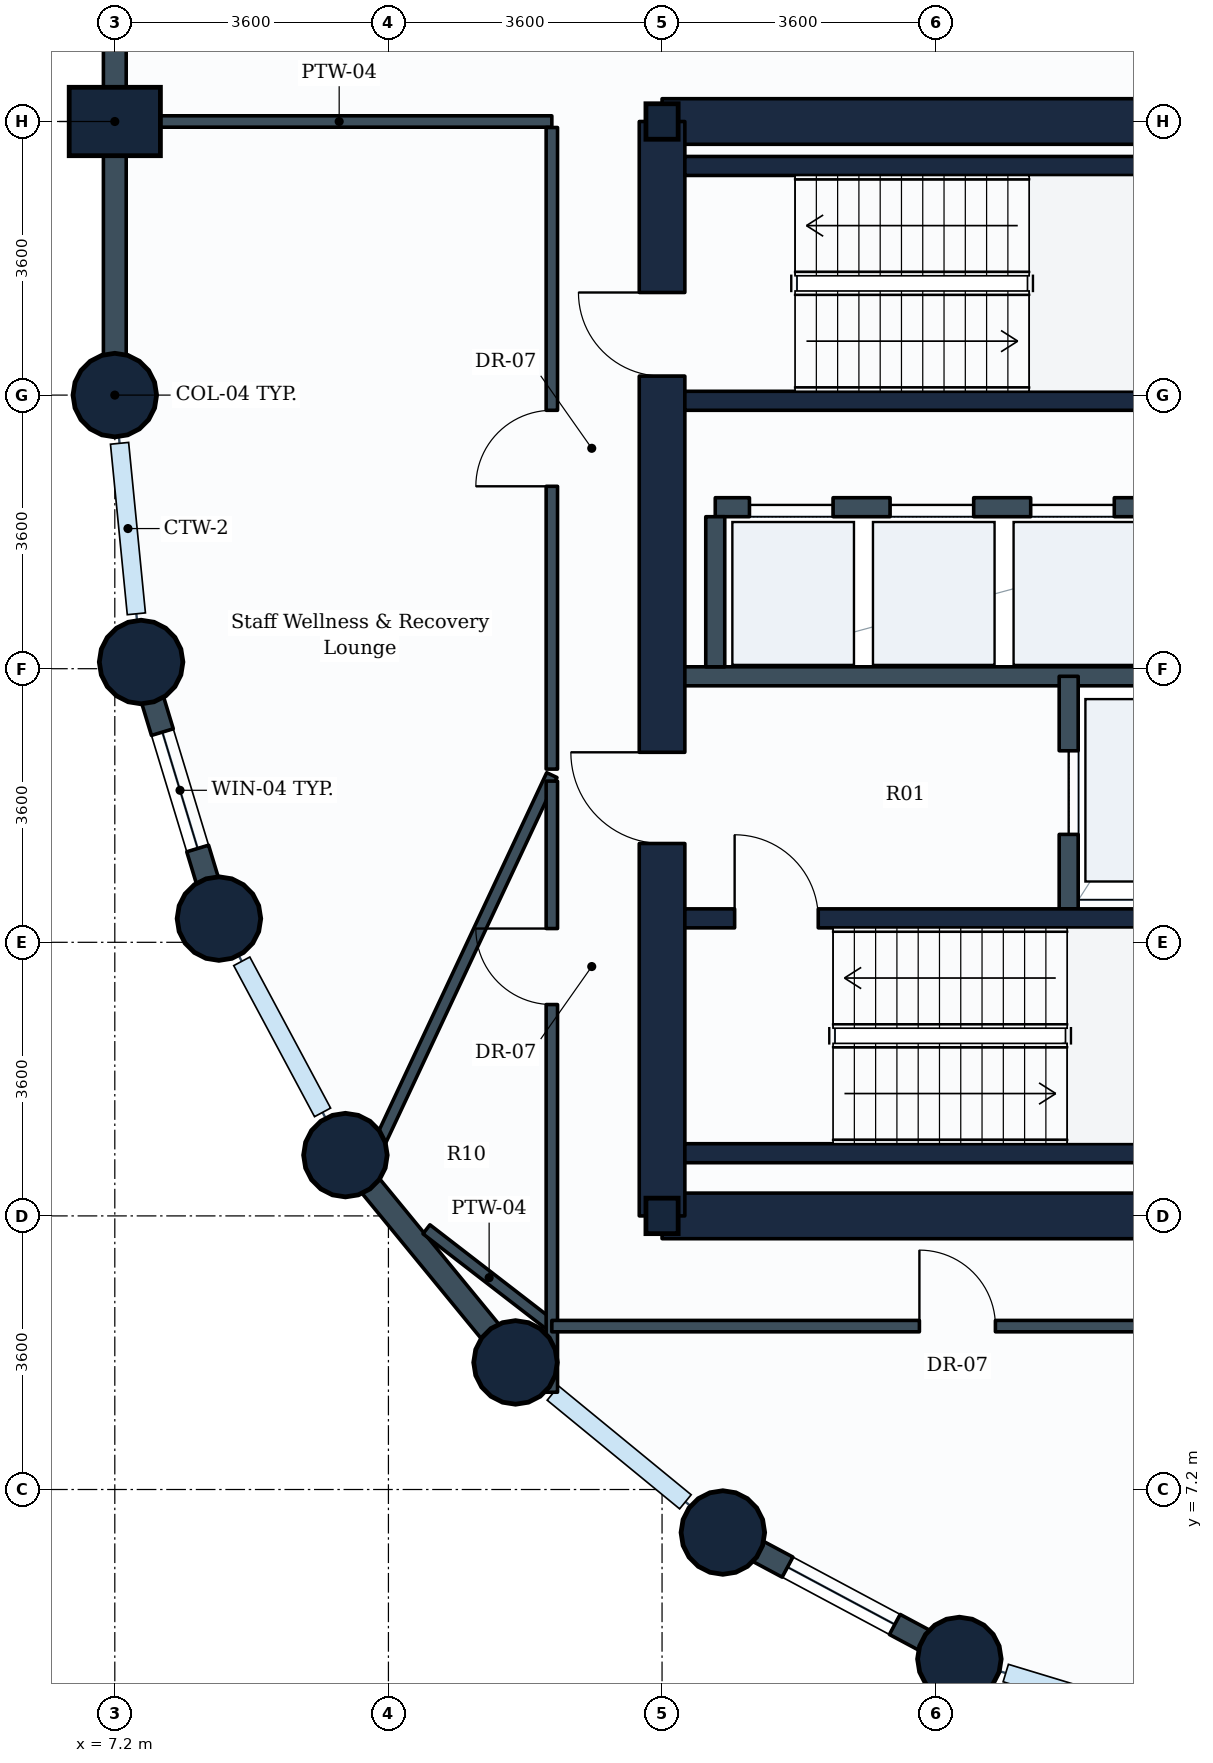
"""IFC4 building model, lengths in metres.
Left out: names, types, materials, properties, quantities, classifications, styles, units other than length and angle.
Written with IfcOpenShell. Run it as: python <this file> out.ifc"""

import sys

from ifc_helpers import new_model, si_unit, direction, frame, frame_2d, origin, origin_2d, place, context, subcontext, project, spatial, rectangle, circle, i_section, extrude, element, fill, save


model = new_model("IFC4")
c1 = context("Model", 3, precision=1e-05, world=origin(), true_north=direction((0.0, 1.0)))
c2 = subcontext(c1, "Body", "Model", "MODEL_VIEW")
j1 = project(units=[si_unit("LENGTHUNIT", "METRE"), si_unit("PLANEANGLEUNIT", "RADIAN")], contexts=[c1])
p1 = place(None, origin())
s1 = spatial("IfcSite", under=j1, at=p1, CompositionType="ELEMENT")
p2 = place(p1, origin())
s2 = spatial("IfcBuilding", under=s1, at=p2, CompositionType="ELEMENT")
p3 = place(p2, frame((0.0, 0.0, 51.3)))
s3 = spatial("IfcBuildingStorey", under=s2, at=p3, CompositionType="ELEMENT", Elevation=51.3)
p4 = place(p3, frame((7.2, 21.6, 0.0), z_axis=(0.0, 0.0, 1.0), x_axis=(1.0, 0.0, 0.0)))
e1 = element("IfcColumn", 1, at=p4, inside=s3, PredefinedType="COLUMN", context=c2, shape_type="SweptSolid", body=[
    extrude(circle(Radius=0.55, at=origin_2d()), origin(), (0.0, 0.0, 1.0), 3.9),
])
p5 = place(p3, frame((7.2, 25.2, 0.0), z_axis=(0.0, 0.0, 1.0), x_axis=(0.0, 1.0, 0.0)))
e2 = element("IfcColumn", 2, at=p5, inside=s3, PredefinedType="COLUMN", context=c2, shape_type="SweptSolid", body=[
    extrude(rectangle(XDim=0.9, YDim=1.2, at=origin_2d()), origin(), (0.0, 0.0, 1.0), 3.9),
])
for number, where, z_axis, x_axis in (
    (3, (7.546, 18.088, 0.0), (0.0, 0.0, 1.0), (1.0, 0.0, 0.0)),
    (4, (8.57, 14.712, 0.0), (0.0, 0.0, 1.0), (1.0, 0.0, 0.0)),
    (5, (10.234, 11.6, 0.0), (0.0, 0.0, 1.0), (1.0, 0.0, 0.0)),
    (6, (12.472, 8.872, 0.0), (0.0, 0.0, 1.0), (1.0, 0.0, 0.0)),
):
    element("IfcColumn", number, at=place(p3, frame(where, z_axis=z_axis, x_axis=x_axis)), inside=s3, PredefinedType="COLUMN", context=c2, shape_type="SweptSolid", body=[
        extrude(circle(Radius=0.55, at=origin_2d()), origin(), (0.0, 0.0, 1.0), 3.9),
    ])
for number, where, z_axis, x_axis in (
    (7, (14.4, 10.8, 0.0), (0.0, 0.0, 1.0), (1.0, 0.0, 0.0)),
    (8, (14.4, 25.2, 0.0), (0.0, 0.0, 1.0), (1.0, 0.0, 0.0)),
):
    element("IfcColumn", number, at=place(p3, frame(where, z_axis=z_axis, x_axis=x_axis)), inside=s3, PredefinedType="COLUMN", context=c2, shape_type="SweptSolid", body=[
        extrude(i_section(OverallWidth=0.424, OverallDepth=0.467, WebThickness=0.033, FlangeThickness=0.053, FilletRadius=0.015, at=origin_2d()), origin(), (0.0, 0.0, 1.0), 3.9),
    ])
for number, where, z_axis, x_axis in (
    (9, (15.2, 6.634, 0.0), (0.0, 0.0, 1.0), (1.0, 0.0, 0.0)),
    (10, (18.312, 4.97, 0.0), (0.0, 0.0, 1.0), (1.0, 0.0, 0.0)),
):
    element("IfcColumn", number, at=place(p3, frame(where, z_axis=z_axis, x_axis=x_axis)), inside=s3, PredefinedType="COLUMN", context=c2, shape_type="SweptSolid", body=[
        extrude(circle(Radius=0.55, at=origin_2d()), origin(), (0.0, 0.0, 1.0), 3.9),
    ])
p6 = place(p3, frame((7.2, 25.2, 0.0), z_axis=(0.0, 0.0, 1.0), x_axis=(0.0, 1.0, 0.0)))
e11 = element("IfcWall", 11, at=p6, inside=s3, PredefinedType="STANDARD", context=c2, shape_type="SweptSolid", body=[
    extrude(rectangle(XDim=3.6, YDim=0.3, at=frame_2d((1.8, 0.0))), origin(), (0.0, 0.0, 1.0), 2.93),
])
p7 = place(p3, frame((7.2, 21.6, 0.0), z_axis=(0.0, 0.0, 1.0), x_axis=(0.0, 1.0, 0.0)))
e12 = element("IfcWall", 12, at=p7, inside=s3, PredefinedType="STANDARD", context=c2, shape_type="SweptSolid", body=[
    extrude(rectangle(XDim=3.6, YDim=0.3, at=frame_2d((1.8, 0.0))), origin(), (0.0, 0.0, 1.0), 2.93),
])
p8 = place(p3, frame((8.57, 14.712, 0.0), z_axis=(0.0, 0.0, 1.0), x_axis=(-0.290305086481, 0.956934144423, 0.0)))
e13 = element("IfcWall", 13, at=p8, inside=s3, PredefinedType="STANDARD", context=c2, shape_type="SweptSolid", body=[
    extrude(rectangle(XDim=3.528, YDim=0.3, at=frame_2d((1.764, 0.0))), origin(), (0.0, 0.0, 1.0), 2.93),
])
p9 = place(p8, frame((0.964, 0.0, 0.85)))
e14 = element("IfcOpeningElement", 14, at=p9, cuts=e13, PredefinedType="OPENING", context=c2, shape_type="SweptSolid", body=[
    extrude(rectangle(XDim=1.6, YDim=1.35, at=frame_2d((0.8, 0.675))), frame((0.0, 0.16, 0.0), z_axis=(0.0, -1.0, 0.0), x_axis=(1.0, 0.0, 0.0)), (0.0, 0.0, 1.0), 0.32),
])
p10 = place(p3, frame((12.472, 8.872, 0.0), z_axis=(0.0, 0.0, 1.0), x_axis=(-0.634258295121, 0.773121216285, 0.0)))
e15 = element("IfcWall", 15, at=p10, inside=s3, PredefinedType="STANDARD", context=c2, shape_type="SweptSolid", body=[
    extrude(rectangle(XDim=3.529, YDim=0.3, at=frame_2d((1.764, 0.0))), origin(), (0.0, 0.0, 1.0), 2.93),
])
p11 = place(p3, frame((18.312, 4.97, 0.0), z_axis=(0.0, 0.0, 1.0), x_axis=(-0.881846862014, 0.471535907389, 0.0)))
e16 = element("IfcWall", 16, at=p11, inside=s3, PredefinedType="STANDARD", context=c2, shape_type="SweptSolid", body=[
    extrude(rectangle(XDim=3.529, YDim=0.3, at=frame_2d((1.765, 0.0))), origin(), (0.0, 0.0, 1.0), 2.93),
])
p12 = place(p11, frame((0.964, 0.0, 0.85)))
e17 = element("IfcOpeningElement", 17, at=p12, cuts=e16, PredefinedType="OPENING", context=c2, shape_type="SweptSolid", body=[
    extrude(rectangle(XDim=1.6, YDim=1.35, at=frame_2d((0.8, 0.675))), frame((0.0, 0.16, 0.0), z_axis=(0.0, -1.0, 0.0), x_axis=(1.0, 0.0, 0.0)), (0.0, 0.0, 1.0), 0.32),
])
p13 = place(p3, frame((14.4, 10.8, 0.0), z_axis=(0.0, 0.0, 1.0), x_axis=(1.0, 0.0, 0.0)))
e18 = element("IfcWall", 18, at=p13, inside=s3, PredefinedType="SHEAR", context=c2, shape_type="SweptSolid", body=[
    extrude(rectangle(XDim=18.0, YDim=0.6, at=frame_2d((9.0, 0.0))), origin(), (0.0, 0.0, 1.0), 3.65),
])
p14 = place(p3, frame((14.4, 25.2, 0.0), z_axis=(0.0, 0.0, 1.0), x_axis=(1.0, 0.0, 0.0)))
e19 = element("IfcWall", 19, at=p14, inside=s3, PredefinedType="SHEAR", context=c2, shape_type="SweptSolid", body=[
    extrude(rectangle(XDim=14.4, YDim=0.6, at=frame_2d((7.2, 0.0))), origin(), (0.0, 0.0, 1.0), 3.65),
])
p15 = place(p3, frame((14.4, 10.8, 0.0), z_axis=(0.0, 0.0, 1.0), x_axis=(0.0, 1.0, 0.0)))
e20 = element("IfcWall", 20, at=p15, inside=s3, PredefinedType="SHEAR", context=c2, shape_type="SweptSolid", body=[
    extrude(rectangle(XDim=14.4, YDim=0.6, at=frame_2d((7.2, 0.0))), origin(), (0.0, 0.0, 1.0), 3.65),
])
p16 = place(p15, frame((11.05, 0.0, 0.0)))
e21 = element("IfcOpeningElement", 21, at=p16, cuts=e20, PredefinedType="OPENING", context=c2, shape_type="SweptSolid", body=[
    extrude(rectangle(XDim=1.1, YDim=2.1, at=frame_2d((0.55, 1.05))), frame((0.0, 0.31, 0.0), z_axis=(0.0, -1.0, 0.0), x_axis=(1.0, 0.0, 0.0)), (0.0, 0.0, 1.0), 0.62),
])
p17 = place(p15, frame((4.9, 0.0, 0.0)))
e22 = element("IfcOpeningElement", 22, at=p17, cuts=e20, PredefinedType="OPENING", context=c2, shape_type="SweptSolid", body=[
    extrude(rectangle(XDim=1.2, YDim=2.1, at=frame_2d((0.6, 1.05))), frame((0.0, 0.31, 0.0), z_axis=(0.0, -1.0, 0.0), x_axis=(1.0, 0.0, 0.0)), (0.0, 0.0, 1.0), 0.62),
])
p18 = place(p3, frame((14.7, 11.625, 0.0), z_axis=(0.0, 0.0, 1.0), x_axis=(1.0, 0.0, 0.0)))
e23 = element("IfcWall", 23, at=p18, inside=s3, PredefinedType="SHEAR", context=c2, shape_type="SweptSolid", body=[
    extrude(rectangle(XDim=8.65, YDim=0.25, at=frame_2d((4.325, 0.0))), origin(), (0.0, 0.0, 1.0), 3.65),
])
p19 = place(p3, frame((14.7, 14.715, 0.0), z_axis=(0.0, 0.0, 1.0), x_axis=(1.0, 0.0, 0.0)))
e24 = element("IfcWall", 24, at=p19, inside=s3, PredefinedType="SHEAR", context=c2, shape_type="SweptSolid", body=[
    extrude(rectangle(XDim=8.65, YDim=0.25, at=frame_2d((4.325, 0.0))), origin(), (0.0, 0.0, 1.0), 3.65),
])
p20 = place(p19, frame((0.655, 0.0, 0.0)))
e25 = element("IfcOpeningElement", 25, at=p20, cuts=e24, PredefinedType="OPENING", context=c2, shape_type="SweptSolid", body=[
    extrude(rectangle(XDim=1.1, YDim=2.1, at=frame_2d((0.55, 1.05))), frame((0.0, 0.135, 0.0), z_axis=(0.0, -1.0, 0.0), x_axis=(1.0, 0.0, 0.0)), (0.0, 0.0, 1.0), 0.27),
])
for number, where, z_axis, x_axis in (
    (26, (14.7, 21.525, 0.0), (0.0, 0.0, 1.0), (1.0, 0.0, 0.0)),
    (27, (14.7, 24.615, 0.0), (0.0, 0.0, 1.0), (1.0, 0.0, 0.0)),
):
    element("IfcWall", number, at=place(p3, frame(where, z_axis=z_axis, x_axis=x_axis)), inside=s3, PredefinedType="SHEAR", context=c2, shape_type="SweptSolid", body=[
        extrude(rectangle(XDim=8.2, YDim=0.25, at=frame_2d((4.1, 0.0))), origin(), (0.0, 0.0, 1.0), 3.65),
    ])
p21 = place(p3, frame((14.65, 17.9, 0.0), z_axis=(0.0, 0.0, 1.0), x_axis=(1.0, 0.0, 0.0)))
e28 = element("IfcWall", 28, at=p21, inside=s3, PredefinedType="PARTITIONING", context=c2, shape_type="SweptSolid", body=[
    extrude(rectangle(XDim=7.15, YDim=0.25, at=frame_2d((3.575, 0.0))), origin(), (0.0, 0.0, 1.0), 3.635),
])
p22 = place(p3, frame((19.75, 14.84, 0.0), z_axis=(0.0, 0.0, 1.0), x_axis=(0.0, 1.0, 0.0)))
e29 = element("IfcWall", 29, at=p22, inside=s3, PredefinedType="PARTITIONING", context=c2, shape_type="SweptSolid", body=[
    extrude(rectangle(XDim=3.06, YDim=0.25, at=frame_2d((1.53, 0.0))), origin(), (0.0, 0.0, 1.0), 3.635),
])
p23 = place(p22, frame((0.98, 0.0, 0.0)))
e30 = element("IfcOpeningElement", 30, at=p23, cuts=e29, PredefinedType="OPENING", context=c2, shape_type="SweptSolid", body=[
    extrude(rectangle(XDim=1.1, YDim=2.1, at=frame_2d((0.55, 1.05))), frame((0.0, 0.135, 0.0), z_axis=(0.0, -1.0, 0.0), x_axis=(1.0, 0.0, 0.0)), (0.0, 0.0, 1.0), 0.27),
])
p24 = place(p3, frame((15.1, 20.125, 0.0), z_axis=(0.0, 0.0, 1.0), x_axis=(1.0, 0.0, 0.0)))
e31 = element("IfcWall", 31, at=p24, inside=s3, PredefinedType="PARTITIONING", context=c2, shape_type="SweptSolid", body=[
    extrude(rectangle(XDim=7.55, YDim=0.25, at=frame_2d((3.775, 0.0))), origin(), (0.0, 0.0, 1.0), 3.635),
])
p25 = place(p24, frame((0.45, 0.0, 0.0)))
e32 = element("IfcOpeningElement", 32, at=p25, cuts=e31, PredefinedType="OPENING", context=c2, shape_type="SweptSolid", body=[
    extrude(rectangle(XDim=1.1, YDim=2.1, at=frame_2d((0.55, 1.05))), frame((0.0, 0.135, 0.0), z_axis=(0.0, -1.0, 0.0), x_axis=(1.0, 0.0, 0.0)), (0.0, 0.0, 1.0), 0.27),
])
p26 = place(p24, frame((2.3, 0.0, 0.0)))
e33 = element("IfcOpeningElement", 33, at=p26, cuts=e31, PredefinedType="OPENING", context=c2, shape_type="SweptSolid", body=[
    extrude(rectangle(XDim=1.1, YDim=2.1, at=frame_2d((0.55, 1.05))), frame((0.0, 0.135, 0.0), z_axis=(0.0, -1.0, 0.0), x_axis=(1.0, 0.0, 0.0)), (0.0, 0.0, 1.0), 0.27),
])
p27 = place(p24, frame((4.15, 0.0, 0.0)))
e34 = element("IfcOpeningElement", 34, at=p27, cuts=e31, PredefinedType="OPENING", context=c2, shape_type="SweptSolid", body=[
    extrude(rectangle(XDim=1.1, YDim=2.1, at=frame_2d((0.55, 1.05))), frame((0.0, 0.135, 0.0), z_axis=(0.0, -1.0, 0.0), x_axis=(1.0, 0.0, 0.0)), (0.0, 0.0, 1.0), 0.27),
])
p28 = place(p24, frame((6.0, 0.0, 0.0)))
e35 = element("IfcOpeningElement", 35, at=p28, cuts=e31, PredefinedType="OPENING", context=c2, shape_type="SweptSolid", body=[
    extrude(rectangle(XDim=1.1, YDim=2.1, at=frame_2d((0.55, 1.05))), frame((0.0, 0.135, 0.0), z_axis=(0.0, -1.0, 0.0), x_axis=(1.0, 0.0, 0.0)), (0.0, 0.0, 1.0), 0.27),
])
p29 = place(p3, frame((15.1, 18.025, 0.0), z_axis=(0.0, 0.0, 1.0), x_axis=(0.0, 1.0, 0.0)))
e36 = element("IfcWall", 36, at=p29, inside=s3, PredefinedType="PARTITIONING", context=c2, shape_type="SweptSolid", body=[
    extrude(rectangle(XDim=1.975, YDim=0.25, at=frame_2d((0.988, 0.0))), origin(), (0.0, 0.0, 1.0), 3.635),
])
p30 = place(p3, frame((7.354, 25.2, 0.0), z_axis=(0.0, 0.0, 1.0), x_axis=(1.0, 0.0, 0.0)))
e37 = element("IfcWall", 37, at=p30, inside=s3, PredefinedType="PARTITIONING", context=c2, shape_type="SweptSolid", body=[
    extrude(rectangle(XDim=5.596, YDim=0.15, at=frame_2d((2.798, 0.0))), origin(), (0.0, 0.0, 1.0), 3.635),
])
p31 = place(p3, frame((12.95, 9.35, 0.0), z_axis=(0.0, 0.0, 1.0), x_axis=(-0.791573423038, 0.611074067474, 0.0)))
e38 = element("IfcWall", 38, at=p31, inside=s3, PredefinedType="PARTITIONING", context=c2, shape_type="SweptSolid", body=[
    extrude(rectangle(XDim=2.084, YDim=0.15, at=frame_2d((1.042, 0.0))), origin(), (0.0, 0.0, 1.0), 2.93),
])
p32 = place(p3, frame((12.95, 16.6, 0.0), z_axis=(0.0, 0.0, 1.0), x_axis=(-0.424335060038, -0.905505249473, 0.0)))
e39 = element("IfcWall", 39, at=p32, inside=s3, PredefinedType="PARTITIONING", context=c2, shape_type="SweptSolid", body=[
    extrude(rectangle(XDim=5.76, YDim=0.15, at=frame_2d((2.88, 0.0))), origin(), (0.0, 0.0, 1.0), 2.93),
])
p33 = place(p3, frame((12.95, 16.679, 0.0), z_axis=(0.0, 0.0, 1.0), x_axis=(0.0, 1.0, 0.0)))
e40 = element("IfcWall", 40, at=p33, inside=s3, PredefinedType="PARTITIONING", context=c2, shape_type="SweptSolid", body=[
    extrude(rectangle(XDim=8.442, YDim=0.15, at=frame_2d((4.221, 0.0))), origin(), (0.0, 0.0, 1.0), 3.08),
])
p34 = place(p33, frame((3.721, 0.0, 0.0)))
e41 = element("IfcOpeningElement", 41, at=p34, cuts=e40, PredefinedType="OPENING", context=c2, shape_type="SweptSolid", body=[
    extrude(rectangle(XDim=1.0, YDim=2.1, at=frame_2d((0.5, 1.05))), frame((0.0, 0.085, 0.0), z_axis=(0.0, -1.0, 0.0), x_axis=(1.0, 0.0, 0.0)), (0.0, 0.0, 1.0), 0.17),
])
p35 = place(p3, frame((12.95, 8.48, 0.0), z_axis=(0.0, 0.0, 1.0), x_axis=(0.0, 1.0, 0.0)))
e42 = element("IfcWall", 42, at=p35, inside=s3, PredefinedType="PARTITIONING", context=c2, shape_type="SweptSolid", body=[
    extrude(rectangle(XDim=8.041, YDim=0.15, at=frame_2d((4.021, 0.0))), origin(), (0.0, 0.0, 1.0), 2.93),
])
p36 = place(p35, frame((5.101, 0.0, 0.0)))
e43 = element("IfcOpeningElement", 43, at=p36, cuts=e42, PredefinedType="OPENING", context=c2, shape_type="SweptSolid", body=[
    extrude(rectangle(XDim=1.0, YDim=2.1, at=frame_2d((0.5, 1.05))), frame((0.0, 0.085, 0.0), z_axis=(0.0, -1.0, 0.0), x_axis=(1.0, 0.0, 0.0)), (0.0, 0.0, 1.0), 0.17),
])
p37 = place(p3, frame((12.95, 9.35, 0.0), z_axis=(0.0, 0.0, 1.0), x_axis=(1.0, 0.0, 0.0)))
e44 = element("IfcWall", 44, at=p37, inside=s3, PredefinedType="PARTITIONING", context=c2, shape_type="SweptSolid", body=[
    extrude(rectangle(XDim=15.771, YDim=0.15, at=frame_2d((7.885, 0.0))), origin(), (0.0, 0.0, 1.0), 3.04),
])
p38 = place(p37, frame((4.836, 0.0, 0.0)))
e45 = element("IfcOpeningElement", 45, at=p38, cuts=e44, PredefinedType="OPENING", context=c2, shape_type="SweptSolid", body=[
    extrude(rectangle(XDim=1.0, YDim=2.1, at=frame_2d((0.5, 1.05))), frame((0.0, 0.085, 0.0), z_axis=(0.0, -1.0, 0.0), x_axis=(1.0, 0.0, 0.0)), (0.0, 0.0, 1.0), 0.17),
])
p39 = place(p9, origin())
e46 = element("IfcWindow", 46, at=p39, inside=s3, PartitioningType="SINGLE_PANEL", PredefinedType="WINDOW", context=c2, shape_type="SweptSolid", body=[
    extrude(rectangle(XDim=1.6, YDim=1.35, at=frame_2d((0.8, 0.675))), frame((0.0, 0.03, 0.0), z_axis=(0.0, -1.0, 0.0), x_axis=(1.0, 0.0, 0.0)), (0.0, 0.0, 1.0), 0.06),
])
fill(e14, e46)
p40 = place(p12, origin())
e47 = element("IfcWindow", 47, at=p40, inside=s3, PartitioningType="SINGLE_PANEL", PredefinedType="WINDOW", context=c2, shape_type="SweptSolid", body=[
    extrude(rectangle(XDim=1.6, YDim=1.35, at=frame_2d((0.8, 0.675))), frame((0.0, 0.03, 0.0), z_axis=(0.0, -1.0, 0.0), x_axis=(1.0, 0.0, 0.0)), (0.0, 0.0, 1.0), 0.06),
])
fill(e17, e47)
p41 = place(p20, origin())
e48 = element("IfcDoor", 48, at=p41, inside=s3, OperationType="SINGLE_SWING_LEFT", PredefinedType="DOOR", context=c2, shape_type="SweptSolid", body=[
    extrude(rectangle(XDim=1.1, YDim=2.1, at=frame_2d((0.55, 1.05))), frame((0.0, 0.025, 0.0), z_axis=(0.0, -1.0, 0.0), x_axis=(1.0, 0.0, 0.0)), (0.0, 0.0, 1.0), 0.05),
])
fill(e25, e48)
p42 = place(p16, origin())
e49 = element("IfcDoor", 49, at=p42, inside=s3, OperationType="SINGLE_SWING_RIGHT", PredefinedType="DOOR", context=c2, shape_type="SweptSolid", body=[
    extrude(rectangle(XDim=1.1, YDim=2.1, at=frame_2d((0.55, 1.05))), frame((0.0, 0.025, 0.0), z_axis=(0.0, -1.0, 0.0), x_axis=(1.0, 0.0, 0.0)), (0.0, 0.0, 1.0), 0.05),
])
fill(e21, e49)
p43 = place(p23, origin())
e50 = element("IfcDoor", 50, at=p43, inside=s3, OperationType="SLIDING_TO_LEFT", PredefinedType="DOOR", context=c2, shape_type="SweptSolid", body=[
    extrude(rectangle(XDim=1.1, YDim=2.1, at=frame_2d((0.55, 1.05))), frame((0.0, 0.025, 0.0), z_axis=(0.0, -1.0, 0.0), x_axis=(1.0, 0.0, 0.0)), (0.0, 0.0, 1.0), 0.05),
])
fill(e30, e50)
p44 = place(p17, origin())
e51 = element("IfcDoor", 51, at=p44, inside=s3, OperationType="SINGLE_SWING_RIGHT", PredefinedType="DOOR", context=c2, shape_type="SweptSolid", body=[
    extrude(rectangle(XDim=1.2, YDim=2.1, at=frame_2d((0.6, 1.05))), frame((0.0, 0.025, 0.0), z_axis=(0.0, -1.0, 0.0), x_axis=(1.0, 0.0, 0.0)), (0.0, 0.0, 1.0), 0.05),
])
fill(e22, e51)
p45 = place(p25, origin())
e52 = element("IfcDoor", 52, at=p45, inside=s3, OperationType="SLIDING_TO_LEFT", PredefinedType="DOOR", context=c2, shape_type="SweptSolid", body=[
    extrude(rectangle(XDim=1.1, YDim=2.1, at=frame_2d((0.55, 1.05))), frame((0.0, 0.025, 0.0), z_axis=(0.0, -1.0, 0.0), x_axis=(1.0, 0.0, 0.0)), (0.0, 0.0, 1.0), 0.05),
])
fill(e32, e52)
p46 = place(p26, origin())
e53 = element("IfcDoor", 53, at=p46, inside=s3, OperationType="SLIDING_TO_LEFT", PredefinedType="DOOR", context=c2, shape_type="SweptSolid", body=[
    extrude(rectangle(XDim=1.1, YDim=2.1, at=frame_2d((0.55, 1.05))), frame((0.0, 0.025, 0.0), z_axis=(0.0, -1.0, 0.0), x_axis=(1.0, 0.0, 0.0)), (0.0, 0.0, 1.0), 0.05),
])
fill(e33, e53)
p47 = place(p27, origin())
e54 = element("IfcDoor", 54, at=p47, inside=s3, OperationType="SLIDING_TO_LEFT", PredefinedType="DOOR", context=c2, shape_type="SweptSolid", body=[
    extrude(rectangle(XDim=1.1, YDim=2.1, at=frame_2d((0.55, 1.05))), frame((0.0, 0.025, 0.0), z_axis=(0.0, -1.0, 0.0), x_axis=(1.0, 0.0, 0.0)), (0.0, 0.0, 1.0), 0.05),
])
fill(e34, e54)
p48 = place(p34, origin())
e55 = element("IfcDoor", 55, at=p48, inside=s3, OperationType="SINGLE_SWING_LEFT", PredefinedType="DOOR", context=c2, shape_type="SweptSolid", body=[
    extrude(rectangle(XDim=1.0, YDim=2.1, at=frame_2d((0.5, 1.05))), frame((0.0, 0.025, 0.0), z_axis=(0.0, -1.0, 0.0), x_axis=(1.0, 0.0, 0.0)), (0.0, 0.0, 1.0), 0.05),
])
fill(e41, e55)
p49 = place(p36, origin())
e56 = element("IfcDoor", 56, at=p49, inside=s3, OperationType="SINGLE_SWING_RIGHT", PredefinedType="DOOR", context=c2, shape_type="SweptSolid", body=[
    extrude(rectangle(XDim=1.0, YDim=2.1, at=frame_2d((0.5, 1.05))), frame((0.0, 0.025, 0.0), z_axis=(0.0, -1.0, 0.0), x_axis=(1.0, 0.0, 0.0)), (0.0, 0.0, 1.0), 0.05),
])
fill(e43, e56)
p50 = place(p38, origin())
e57 = element("IfcDoor", 57, at=p50, inside=s3, OperationType="SINGLE_SWING_LEFT", PredefinedType="DOOR", context=c2, shape_type="SweptSolid", body=[
    extrude(rectangle(XDim=1.0, YDim=2.1, at=frame_2d((0.5, 1.05))), frame((0.0, 0.025, 0.0), z_axis=(0.0, -1.0, 0.0), x_axis=(1.0, 0.0, 0.0)), (0.0, 0.0, 1.0), 0.05),
])
fill(e45, e57)
save(model, sys.argv[1])
